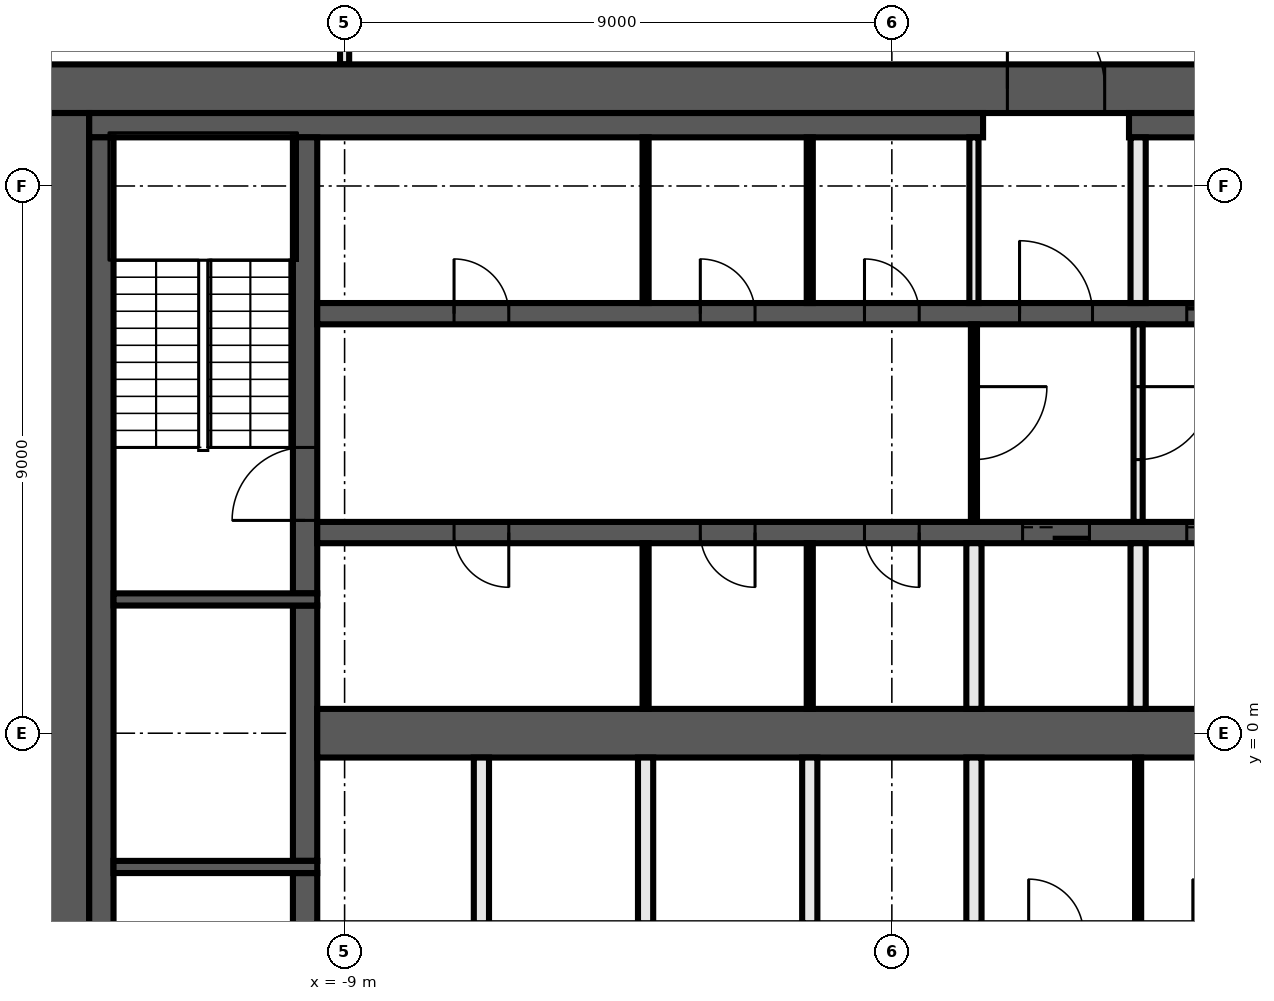
"""IFC4 building model, lengths in metres.
Left out: names, types, materials, properties, quantities, classifications, styles, units other than length and angle.
Written with IfcOpenShell. Run it as: python <this file> out.ifc"""

import sys

from ifc_helpers import new_model, si_unit, direction, frame, frame_2d, origin, place, context, subcontext, project, spatial, rectangle, extrude, element, fill, save


model = new_model("IFC4")
c1 = context("Model", 3, precision=1e-05, world=origin(), true_north=direction((0.0, 1.0)))
c2 = subcontext(c1, "Body", "Model", "MODEL_VIEW")
j1 = project(units=[si_unit("LENGTHUNIT", "METRE"), si_unit("PLANEANGLEUNIT", "RADIAN")], contexts=[c1])
p1 = place(None, origin())
s1 = spatial("IfcSite", under=j1, at=p1, CompositionType="ELEMENT")
p2 = place(p1, origin())
s2 = spatial("IfcBuilding", under=s1, at=p2, CompositionType="ELEMENT")
p3 = place(p2, frame((0.0, 0.0, 158.6)))
s3 = spatial("IfcBuildingStorey", under=s2, at=p3, CompositionType="ELEMENT", Elevation=158.6)
p4 = place(p3, frame((-9.0, 11.0, 0.0), z_axis=(0.0, 0.0, 1.0), x_axis=(0.0, 1.0, 0.0)))
e1 = element("IfcWall", 1, at=p4, inside=s3, PredefinedType="PARTITIONING", context=c2, shape_type="SweptSolid", body=[
    extrude(rectangle(XDim=2.925, YDim=0.15, at=frame_2d((1.462, 0.0))), origin(), (0.0, 0.0, 1.0), 3.82),
])
p5 = place(p3, frame((-14.0, 10.6, 0.0), z_axis=(0.0, 0.0, 1.0), x_axis=(1.0, 0.0, 0.0)))
e2 = element("IfcWall", 2, at=p5, inside=s3, PredefinedType="SHEAR", context=c2, shape_type="SweptSolid", body=[
    extrude(rectangle(XDim=28.0, YDim=0.8, at=frame_2d((14.0, 0.0))), origin(), (0.0, 0.0, 1.0), 3.82),
])
p6 = place(p5, frame((15.9, 0.0, 0.0)))
e3 = element("IfcOpeningElement", 3, at=p6, cuts=e2, PredefinedType="OPENING", context=c2, shape_type="SweptSolid", body=[
    extrude(rectangle(XDim=1.6, YDim=2.1, at=frame_2d((0.8, 1.05))), frame((0.0, 0.41, 0.0), z_axis=(0.0, -1.0, 0.0), x_axis=(1.0, 0.0, 0.0)), (0.0, 0.0, 1.0), 0.82),
])
p7 = place(p3, frame((-13.6, -10.2, 0.0), z_axis=(0.0, 0.0, 1.0), x_axis=(0.0, 1.0, 0.0)))
e4 = element("IfcWall", 4, at=p7, inside=s3, PredefinedType="SHEAR", context=c2, shape_type="SweptSolid", body=[
    extrude(rectangle(XDim=20.4, YDim=0.8, at=frame_2d((10.2, 0.0))), origin(), (0.0, 0.0, 1.0), 3.82),
])
p8 = place(p3, frame((-13.2, 10.0, 0.0), z_axis=(0.0, 0.0, 1.0), x_axis=(1.0, 0.0, 0.0)))
e5 = element("IfcWall", 5, at=p8, inside=s3, PredefinedType="SHEAR", context=c2, shape_type="SweptSolid", body=[
    extrude(rectangle(XDim=14.7, YDim=0.4, at=frame_2d((7.35, 0.0))), origin(), (0.0, 0.0, 1.0), 3.82),
])
p9 = place(p3, frame((3.9, 10.0, 0.0), z_axis=(0.0, 0.0, 1.0), x_axis=(1.0, 0.0, 0.0)))
e6 = element("IfcWall", 6, at=p9, inside=s3, PredefinedType="SHEAR", context=c2, shape_type="SweptSolid", body=[
    extrude(rectangle(XDim=9.3, YDim=0.4, at=frame_2d((4.65, 0.0))), origin(), (0.0, 0.0, 1.0), 3.82),
])
p10 = place(p3, frame((-13.0, -9.8, 0.0), z_axis=(0.0, 0.0, 1.0), x_axis=(0.0, 1.0, 0.0)))
e7 = element("IfcWall", 7, at=p10, inside=s3, PredefinedType="SHEAR", context=c2, shape_type="SweptSolid", body=[
    extrude(rectangle(XDim=19.6, YDim=0.4, at=frame_2d((9.8, 0.0))), origin(), (0.0, 0.0, 1.0), 3.82),
])
p11 = place(p3, frame((-9.65, -9.8, 0.0), z_axis=(0.0, 0.0, 1.0), x_axis=(0.0, 1.0, 0.0)))
e8 = element("IfcWall", 8, at=p11, inside=s3, PredefinedType="SHEAR", context=c2, shape_type="SweptSolid", body=[
    extrude(rectangle(XDim=7.5, YDim=0.4, at=frame_2d((3.75, 0.0))), origin(), (0.0, 0.0, 1.0), 3.82),
])
p12 = place(p11, frame((5.1, 0.0, 0.0)))
e9 = element("IfcOpeningElement", 9, at=p12, cuts=e8, PredefinedType="OPENING", context=c2, shape_type="SweptSolid", body=[
    extrude(rectangle(XDim=1.2, YDim=2.1, at=frame_2d((0.6, 1.05))), frame((0.0, 0.21, 0.0), z_axis=(0.0, -1.0, 0.0), x_axis=(1.0, 0.0, 0.0)), (0.0, 0.0, 1.0), 0.42),
])
p13 = place(p3, frame((-9.65, -2.1, 0.0), z_axis=(0.0, 0.0, 1.0), x_axis=(0.0, 1.0, 0.0)))
e10 = element("IfcWall", 10, at=p13, inside=s3, PredefinedType="SHEAR", context=c2, shape_type="SweptSolid", body=[
    extrude(rectangle(XDim=4.2, YDim=0.4, at=frame_2d((2.1, 0.0))), origin(), (0.0, 0.0, 1.0), 3.82),
])
p14 = place(p3, frame((-9.65, 2.3, 0.0), z_axis=(0.0, 0.0, 1.0), x_axis=(0.0, 1.0, 0.0)))
e11 = element("IfcWall", 11, at=p14, inside=s3, PredefinedType="SHEAR", context=c2, shape_type="SweptSolid", body=[
    extrude(rectangle(XDim=7.5, YDim=0.4, at=frame_2d((3.75, 0.0))), origin(), (0.0, 0.0, 1.0), 3.82),
])
p15 = place(p14, frame((1.2, 0.0, 0.0)))
e12 = element("IfcOpeningElement", 12, at=p15, cuts=e11, PredefinedType="OPENING", context=c2, shape_type="SweptSolid", body=[
    extrude(rectangle(XDim=1.2, YDim=2.1, at=frame_2d((0.6, 1.05))), frame((0.0, 0.21, 0.0), z_axis=(0.0, -1.0, 0.0), x_axis=(1.0, 0.0, 0.0)), (0.0, 0.0, 1.0), 0.42),
])
for number, where, z_axis, x_axis in (
    (13, (-9.45, 2.2, 0.0), (0.0, 0.0, 1.0), (-1.0, 0.0, 0.0)),
    (14, (-9.45, -2.2, 0.0), (0.0, 0.0, 1.0), (-1.0, 0.0, 0.0)),
):
    element("IfcWall", number, at=place(p3, frame(where, z_axis=z_axis, x_axis=x_axis)), inside=s3, PredefinedType="SHEAR", context=c2, shape_type="SweptSolid", body=[
        extrude(rectangle(XDim=3.35, YDim=0.2, at=frame_2d((1.675, 0.0))), origin(), (0.0, 0.0, 1.0), 3.82),
    ])
p16 = place(p3, frame((-9.45, 6.9, 0.0), z_axis=(0.0, 0.0, 1.0), x_axis=(1.0, 0.0, 0.0)))
e15 = element("IfcWall", 15, at=p16, inside=s3, PredefinedType="SHEAR", context=c2, shape_type="SweptSolid", body=[
    extrude(rectangle(XDim=18.9, YDim=0.35, at=frame_2d((9.45, 0.0))), origin(), (0.0, 0.0, 1.0), 3.82),
])
p17 = place(p16, frame((11.55, 0.0, 0.0)))
e16 = element("IfcOpeningElement", 16, at=p17, cuts=e15, PredefinedType="OPENING", context=c2, shape_type="SweptSolid", body=[
    extrude(rectangle(XDim=1.2, YDim=2.1, at=frame_2d((0.6, 1.05))), frame((0.0, 0.185, 0.0), z_axis=(0.0, -1.0, 0.0), x_axis=(1.0, 0.0, 0.0)), (0.0, 0.0, 1.0), 0.37),
])
p18 = place(p16, frame((14.3, 0.0, 0.0)))
e17 = element("IfcOpeningElement", 17, at=p18, cuts=e15, PredefinedType="OPENING", context=c2, shape_type="SweptSolid", body=[
    extrude(rectangle(XDim=1.1, YDim=2.1, at=frame_2d((0.55, 1.05))), frame((0.0, 0.185, 0.0), z_axis=(0.0, -1.0, 0.0), x_axis=(1.0, 0.0, 0.0)), (0.0, 0.0, 1.0), 0.37),
])
p19 = place(p16, frame((17.0, 0.0, 0.0)))
e18 = element("IfcOpeningElement", 18, at=p19, cuts=e15, PredefinedType="OPENING", context=c2, shape_type="SweptSolid", body=[
    extrude(rectangle(XDim=1.1, YDim=2.1, at=frame_2d((0.55, 1.05))), frame((0.0, 0.185, 0.0), z_axis=(0.0, -1.0, 0.0), x_axis=(1.0, 0.0, 0.0)), (0.0, 0.0, 1.0), 0.37),
])
p20 = place(p16, frame((2.25, 0.0, 0.0)))
e19 = element("IfcOpeningElement", 19, at=p20, cuts=e15, PredefinedType="OPENING", context=c2, shape_type="SweptSolid", body=[
    extrude(rectangle(XDim=0.9, YDim=2.1, at=frame_2d((0.45, 1.05))), frame((0.0, 0.185, 0.0), z_axis=(0.0, -1.0, 0.0), x_axis=(1.0, 0.0, 0.0)), (0.0, 0.0, 1.0), 0.37),
])
p21 = place(p16, frame((6.3, 0.0, 0.0)))
e20 = element("IfcOpeningElement", 20, at=p21, cuts=e15, PredefinedType="OPENING", context=c2, shape_type="SweptSolid", body=[
    extrude(rectangle(XDim=0.9, YDim=2.1, at=frame_2d((0.45, 1.05))), frame((0.0, 0.185, 0.0), z_axis=(0.0, -1.0, 0.0), x_axis=(1.0, 0.0, 0.0)), (0.0, 0.0, 1.0), 0.37),
])
p22 = place(p16, frame((9.0, 0.0, 0.0)))
e21 = element("IfcOpeningElement", 21, at=p22, cuts=e15, PredefinedType="OPENING", context=c2, shape_type="SweptSolid", body=[
    extrude(rectangle(XDim=0.9, YDim=2.1, at=frame_2d((0.45, 1.05))), frame((0.0, 0.185, 0.0), z_axis=(0.0, -1.0, 0.0), x_axis=(1.0, 0.0, 0.0)), (0.0, 0.0, 1.0), 0.37),
])
p23 = place(p3, frame((9.45, 3.3, 0.0), z_axis=(0.0, 0.0, 1.0), x_axis=(-1.0, 0.0, 0.0)))
e22 = element("IfcWall", 22, at=p23, inside=s3, PredefinedType="SHEAR", context=c2, shape_type="SweptSolid", body=[
    extrude(rectangle(XDim=18.9, YDim=0.35, at=frame_2d((9.45, 0.0))), origin(), (0.0, 0.0, 1.0), 3.82),
])
p24 = place(p23, frame((6.2, 0.0, 0.0)))
e23 = element("IfcOpeningElement", 23, at=p24, cuts=e22, PredefinedType="OPENING", context=c2, shape_type="SweptSolid", body=[
    extrude(rectangle(XDim=1.1, YDim=2.1, at=frame_2d((0.55, 1.05))), frame((0.0, 0.185, 0.0), z_axis=(0.0, -1.0, 0.0), x_axis=(1.0, 0.0, 0.0)), (0.0, 0.0, 1.0), 0.37),
])
p25 = place(p23, frame((3.5, 0.0, 0.0)))
e24 = element("IfcOpeningElement", 24, at=p25, cuts=e22, PredefinedType="OPENING", context=c2, shape_type="SweptSolid", body=[
    extrude(rectangle(XDim=1.1, YDim=2.1, at=frame_2d((0.55, 1.05))), frame((0.0, 0.185, 0.0), z_axis=(0.0, -1.0, 0.0), x_axis=(1.0, 0.0, 0.0)), (0.0, 0.0, 1.0), 0.37),
])
p26 = place(p23, frame((0.9, 0.0, 0.0)))
e25 = element("IfcOpeningElement", 25, at=p26, cuts=e22, PredefinedType="OPENING", context=c2, shape_type="SweptSolid", body=[
    extrude(rectangle(XDim=0.9, YDim=2.1, at=frame_2d((0.45, 1.05))), frame((0.0, 0.185, 0.0), z_axis=(0.0, -1.0, 0.0), x_axis=(1.0, 0.0, 0.0)), (0.0, 0.0, 1.0), 0.37),
])
p27 = place(p23, frame((15.75, 0.0, 0.0)))
e26 = element("IfcOpeningElement", 26, at=p27, cuts=e22, PredefinedType="OPENING", context=c2, shape_type="SweptSolid", body=[
    extrude(rectangle(XDim=0.9, YDim=2.1, at=frame_2d((0.45, 1.05))), frame((0.0, 0.185, 0.0), z_axis=(0.0, -1.0, 0.0), x_axis=(1.0, 0.0, 0.0)), (0.0, 0.0, 1.0), 0.37),
])
p28 = place(p23, frame((11.7, 0.0, 0.0)))
e27 = element("IfcOpeningElement", 27, at=p28, cuts=e22, PredefinedType="OPENING", context=c2, shape_type="SweptSolid", body=[
    extrude(rectangle(XDim=0.9, YDim=2.1, at=frame_2d((0.45, 1.05))), frame((0.0, 0.185, 0.0), z_axis=(0.0, -1.0, 0.0), x_axis=(1.0, 0.0, 0.0)), (0.0, 0.0, 1.0), 0.37),
])
p29 = place(p23, frame((9.0, 0.0, 0.0)))
e28 = element("IfcOpeningElement", 28, at=p29, cuts=e22, PredefinedType="OPENING", context=c2, shape_type="SweptSolid", body=[
    extrude(rectangle(XDim=0.9, YDim=2.1, at=frame_2d((0.45, 1.05))), frame((0.0, 0.185, 0.0), z_axis=(0.0, -1.0, 0.0), x_axis=(1.0, 0.0, 0.0)), (0.0, 0.0, 1.0), 0.37),
])
p30 = place(p3, frame((-9.45, 0.0, 0.0), z_axis=(0.0, 0.0, 1.0), x_axis=(1.0, 0.0, 0.0)))
e29 = element("IfcWall", 29, at=p30, inside=s3, PredefinedType="SHEAR", context=c2, shape_type="SweptSolid", body=[
    extrude(rectangle(XDim=18.9, YDim=0.8, at=frame_2d((9.45, 0.0))), origin(), (0.0, 0.0, 1.0), 3.82),
])
p31 = place(p3, frame((4.05, 6.725, 0.0), z_axis=(0.0, 0.0, 1.0), x_axis=(0.0, -1.0, 0.0)))
e30 = element("IfcWall", 30, at=p31, inside=s3, PredefinedType="PARTITIONING", context=c2, shape_type="SweptSolid", body=[
    extrude(rectangle(XDim=3.25, YDim=0.15, at=frame_2d((1.625, 0.0))), origin(), (0.0, 0.0, 1.0), 3.82),
])
p32 = place(p31, frame((1.025, 0.0, 0.0)))
e31 = element("IfcOpeningElement", 31, at=p32, cuts=e30, PredefinedType="OPENING", context=c2, shape_type="SweptSolid", body=[
    extrude(rectangle(XDim=1.2, YDim=2.1, at=frame_2d((0.6, 1.05))), frame((0.0, 0.085, 0.0), z_axis=(0.0, -1.0, 0.0), x_axis=(1.0, 0.0, 0.0)), (0.0, 0.0, 1.0), 0.17),
])
p33 = place(p3, frame((4.05, -3.125, 0.0), z_axis=(0.0, 0.0, 1.0), x_axis=(0.0, 1.0, 0.0)))
e32 = element("IfcWall", 32, at=p33, inside=s3, PredefinedType="PARTITIONING", context=c2, shape_type="SweptSolid", body=[
    extrude(rectangle(XDim=2.725, YDim=0.1, at=frame_2d((1.363, 0.0))), origin(), (0.0, 0.0, 1.0), 3.82),
])
for number, where, z_axis, x_axis in (
    (33, (4.05, 0.4, 0.0), (0.0, 0.0, 1.0), (0.0, 1.0, 0.0)),
    (34, (4.05, 7.075, 0.0), (0.0, 0.0, 1.0), (0.0, 1.0, 0.0)),
):
    element("IfcWall", number, at=place(p3, frame(where, z_axis=z_axis, x_axis=x_axis)), inside=s3, PredefinedType="SOLIDWALL", context=c2, shape_type="SweptSolid", body=[
        extrude(rectangle(XDim=2.725, YDim=0.25, at=frame_2d((1.363, 0.0))), origin(), (0.0, 0.0, 1.0), 3.82),
    ])
p34 = place(p3, frame((1.35, 7.075, 0.0), z_axis=(0.0, 0.0, 1.0), x_axis=(0.0, 1.0, 0.0)))
e35 = element("IfcWall", 35, at=p34, inside=s3, PredefinedType="PARTITIONING", context=c2, shape_type="SweptSolid", body=[
    extrude(rectangle(XDim=2.725, YDim=0.15, at=frame_2d((1.363, 0.0))), origin(), (0.0, 0.0, 1.0), 3.82),
])
p35 = place(p3, frame((1.35, 6.725, 0.0), z_axis=(0.0, 0.0, 1.0), x_axis=(0.0, -1.0, 0.0)))
e36 = element("IfcWall", 36, at=p35, inside=s3, PredefinedType="PARTITIONING", context=c2, shape_type="SweptSolid", body=[
    extrude(rectangle(XDim=3.25, YDim=0.1, at=frame_2d((1.625, 0.0))), origin(), (0.0, 0.0, 1.0), 3.82),
])
p36 = place(p35, frame((1.025, 0.0, 0.0)))
e37 = element("IfcOpeningElement", 37, at=p36, cuts=e36, PredefinedType="OPENING", context=c2, shape_type="SweptSolid", body=[
    extrude(rectangle(XDim=1.2, YDim=2.1, at=frame_2d((0.6, 1.05))), frame((0.0, 0.06, 0.0), z_axis=(0.0, -1.0, 0.0), x_axis=(1.0, 0.0, 0.0)), (0.0, 0.0, 1.0), 0.12),
])
for number, where, z_axis, x_axis in (
    (38, (1.35, -3.125, 0.0), (0.0, 0.0, 1.0), (0.0, 1.0, 0.0)),
    (39, (1.35, 0.4, 0.0), (0.0, 0.0, 1.0), (0.0, 1.0, 0.0)),
):
    element("IfcWall", number, at=place(p3, frame(where, z_axis=z_axis, x_axis=x_axis)), inside=s3, PredefinedType="SOLIDWALL", context=c2, shape_type="SweptSolid", body=[
        extrude(rectangle(XDim=2.725, YDim=0.25, at=frame_2d((1.363, 0.0))), origin(), (0.0, 0.0, 1.0), 3.82),
    ])
for number, where, z_axis, x_axis in (
    (40, (-1.35, 0.4, 0.0), (0.0, 0.0, 1.0), (0.0, 1.0, 0.0)),
    (41, (-1.35, 7.075, 0.0), (0.0, 0.0, 1.0), (0.0, 1.0, 0.0)),
):
    element("IfcWall", number, at=place(p3, frame(where, z_axis=z_axis, x_axis=x_axis)), inside=s3, PredefinedType="PARTITIONING", context=c2, shape_type="SweptSolid", body=[
        extrude(rectangle(XDim=2.725, YDim=0.1, at=frame_2d((1.363, 0.0))), origin(), (0.0, 0.0, 1.0), 3.82),
    ])
p37 = place(p3, frame((-1.35, -3.125, 0.0), z_axis=(0.0, 0.0, 1.0), x_axis=(0.0, 1.0, 0.0)))
e42 = element("IfcWall", 42, at=p37, inside=s3, PredefinedType="SOLIDWALL", context=c2, shape_type="SweptSolid", body=[
    extrude(rectangle(XDim=2.725, YDim=0.25, at=frame_2d((1.363, 0.0))), origin(), (0.0, 0.0, 1.0), 3.82),
])
for number, where, z_axis, x_axis in (
    (43, (-4.05, 0.4, 0.0), (0.0, 0.0, 1.0), (0.0, 1.0, 0.0)),
    (44, (-4.05, 7.075, 0.0), (0.0, 0.0, 1.0), (0.0, 1.0, 0.0)),
):
    element("IfcWall", number, at=place(p3, frame(where, z_axis=z_axis, x_axis=x_axis)), inside=s3, PredefinedType="PARTITIONING", context=c2, shape_type="SweptSolid", body=[
        extrude(rectangle(XDim=2.725, YDim=0.1, at=frame_2d((1.363, 0.0))), origin(), (0.0, 0.0, 1.0), 3.82),
    ])
for number, where, z_axis, x_axis in (
    (45, (-4.05, -3.125, 0.0), (0.0, 0.0, 1.0), (0.0, 1.0, 0.0)),
    (46, (-6.75, -3.125, 0.0), (0.0, 0.0, 1.0), (0.0, 1.0, 0.0)),
):
    element("IfcWall", number, at=place(p3, frame(where, z_axis=z_axis, x_axis=x_axis)), inside=s3, PredefinedType="SOLIDWALL", context=c2, shape_type="SweptSolid", body=[
        extrude(rectangle(XDim=2.725, YDim=0.25, at=frame_2d((1.363, 0.0))), origin(), (0.0, 0.0, 1.0), 3.82),
    ])
p38 = place(p6, origin())
e47 = element("IfcDoor", 47, at=p38, inside=s3, OperationType="DOUBLE_DOOR_SINGLE_SWING", PredefinedType="DOOR", context=c2, shape_type="SweptSolid", body=[
    extrude(rectangle(XDim=1.6, YDim=2.1, at=frame_2d((0.8, 1.05))), frame((0.0, 0.025, 0.0), z_axis=(0.0, -1.0, 0.0), x_axis=(1.0, 0.0, 0.0)), (0.0, 0.0, 1.0), 0.05),
])
fill(e3, e47)
p39 = place(p17, origin())
e48 = element("IfcDoor", 48, at=p39, inside=s3, OperationType="SINGLE_SWING_LEFT", PredefinedType="DOOR", context=c2, shape_type="SweptSolid", body=[
    extrude(rectangle(XDim=1.2, YDim=2.1, at=frame_2d((0.6, 1.05))), frame((0.0, 0.025, 0.0), z_axis=(0.0, -1.0, 0.0), x_axis=(1.0, 0.0, 0.0)), (0.0, 0.0, 1.0), 0.05),
])
fill(e16, e48)
p40 = place(p18, origin())
e49 = element("IfcDoor", 49, at=p40, inside=s3, OperationType="DOUBLE_DOOR_SLIDING", PredefinedType="DOOR", context=c2, shape_type="SweptSolid", body=[
    extrude(rectangle(XDim=1.1, YDim=2.1, at=frame_2d((0.55, 1.05))), frame((0.0, 0.025, 0.0), z_axis=(0.0, -1.0, 0.0), x_axis=(1.0, 0.0, 0.0)), (0.0, 0.0, 1.0), 0.05),
])
fill(e17, e49)
p41 = place(p24, origin())
e50 = element("IfcDoor", 50, at=p41, inside=s3, OperationType="DOUBLE_DOOR_SLIDING", PredefinedType="DOOR", context=c2, shape_type="SweptSolid", body=[
    extrude(rectangle(XDim=1.1, YDim=2.1, at=frame_2d((0.55, 1.05))), frame((0.0, 0.025, 0.0), z_axis=(0.0, -1.0, 0.0), x_axis=(1.0, 0.0, 0.0)), (0.0, 0.0, 1.0), 0.05),
])
fill(e23, e50)
p42 = place(p25, origin())
e51 = element("IfcDoor", 51, at=p42, inside=s3, OperationType="DOUBLE_DOOR_SLIDING", PredefinedType="DOOR", context=c2, shape_type="SweptSolid", body=[
    extrude(rectangle(XDim=1.1, YDim=2.1, at=frame_2d((0.55, 1.05))), frame((0.0, 0.025, 0.0), z_axis=(0.0, -1.0, 0.0), x_axis=(1.0, 0.0, 0.0)), (0.0, 0.0, 1.0), 0.05),
])
fill(e24, e51)
p43 = place(p20, origin())
e52 = element("IfcDoor", 52, at=p43, inside=s3, OperationType="SINGLE_SWING_RIGHT", PredefinedType="DOOR", context=c2, shape_type="SweptSolid", body=[
    extrude(rectangle(XDim=0.9, YDim=2.1, at=frame_2d((0.45, 1.05))), frame((0.0, 0.025, 0.0), z_axis=(0.0, -1.0, 0.0), x_axis=(1.0, 0.0, 0.0)), (0.0, 0.0, 1.0), 0.05),
])
fill(e19, e52)
p44 = place(p21, origin())
e53 = element("IfcDoor", 53, at=p44, inside=s3, OperationType="SINGLE_SWING_LEFT", PredefinedType="DOOR", context=c2, shape_type="SweptSolid", body=[
    extrude(rectangle(XDim=0.9, YDim=2.1, at=frame_2d((0.45, 1.05))), frame((0.0, 0.025, 0.0), z_axis=(0.0, -1.0, 0.0), x_axis=(1.0, 0.0, 0.0)), (0.0, 0.0, 1.0), 0.05),
])
fill(e20, e53)
p45 = place(p22, origin())
e54 = element("IfcDoor", 54, at=p45, inside=s3, OperationType="SINGLE_SWING_RIGHT", PredefinedType="DOOR", context=c2, shape_type="SweptSolid", body=[
    extrude(rectangle(XDim=0.9, YDim=2.1, at=frame_2d((0.45, 1.05))), frame((0.0, 0.025, 0.0), z_axis=(0.0, -1.0, 0.0), x_axis=(1.0, 0.0, 0.0)), (0.0, 0.0, 1.0), 0.05),
])
fill(e21, e54)
p46 = place(p27, origin())
e55 = element("IfcDoor", 55, at=p46, inside=s3, OperationType="SINGLE_SWING_LEFT", PredefinedType="DOOR", context=c2, shape_type="SweptSolid", body=[
    extrude(rectangle(XDim=0.9, YDim=2.1, at=frame_2d((0.45, 1.05))), frame((0.0, 0.025, 0.0), z_axis=(0.0, -1.0, 0.0), x_axis=(1.0, 0.0, 0.0)), (0.0, 0.0, 1.0), 0.05),
])
fill(e26, e55)
p47 = place(p28, origin())
e56 = element("IfcDoor", 56, at=p47, inside=s3, OperationType="SINGLE_SWING_RIGHT", PredefinedType="DOOR", context=c2, shape_type="SweptSolid", body=[
    extrude(rectangle(XDim=0.9, YDim=2.1, at=frame_2d((0.45, 1.05))), frame((0.0, 0.025, 0.0), z_axis=(0.0, -1.0, 0.0), x_axis=(1.0, 0.0, 0.0)), (0.0, 0.0, 1.0), 0.05),
])
fill(e27, e56)
p48 = place(p29, origin())
e57 = element("IfcDoor", 57, at=p48, inside=s3, OperationType="SINGLE_SWING_LEFT", PredefinedType="DOOR", context=c2, shape_type="SweptSolid", body=[
    extrude(rectangle(XDim=0.9, YDim=2.1, at=frame_2d((0.45, 1.05))), frame((0.0, 0.025, 0.0), z_axis=(0.0, -1.0, 0.0), x_axis=(1.0, 0.0, 0.0)), (0.0, 0.0, 1.0), 0.05),
])
fill(e28, e57)
p49 = place(p15, origin())
e58 = element("IfcDoor", 58, at=p49, inside=s3, OperationType="SINGLE_SWING_RIGHT", PredefinedType="DOOR", context=c2, shape_type="SweptSolid", body=[
    extrude(rectangle(XDim=1.2, YDim=2.1, at=frame_2d((0.6, 1.05))), frame((0.0, 0.025, 0.0), z_axis=(0.0, -1.0, 0.0), x_axis=(1.0, 0.0, 0.0)), (0.0, 0.0, 1.0), 0.05),
])
fill(e12, e58)
p50 = place(p36, origin())
e59 = element("IfcDoor", 59, at=p50, inside=s3, OperationType="SINGLE_SWING_LEFT", PredefinedType="DOOR", context=c2, shape_type="SweptSolid", body=[
    extrude(rectangle(XDim=1.2, YDim=2.1, at=frame_2d((0.6, 1.05))), frame((0.0, 0.025, 0.0), z_axis=(0.0, -1.0, 0.0), x_axis=(1.0, 0.0, 0.0)), (0.0, 0.0, 1.0), 0.05),
])
fill(e37, e59)
p51 = place(p32, origin())
e60 = element("IfcDoor", 60, at=p51, inside=s3, OperationType="SINGLE_SWING_RIGHT", PredefinedType="DOOR", context=c2, shape_type="SweptSolid", body=[
    extrude(rectangle(XDim=1.2, YDim=2.1, at=frame_2d((0.6, 1.05))), frame((0.0, 0.025, 0.0), z_axis=(0.0, -1.0, 0.0), x_axis=(1.0, 0.0, 0.0)), (0.0, 0.0, 1.0), 0.05),
])
fill(e31, e60)
save(model, sys.argv[1])
